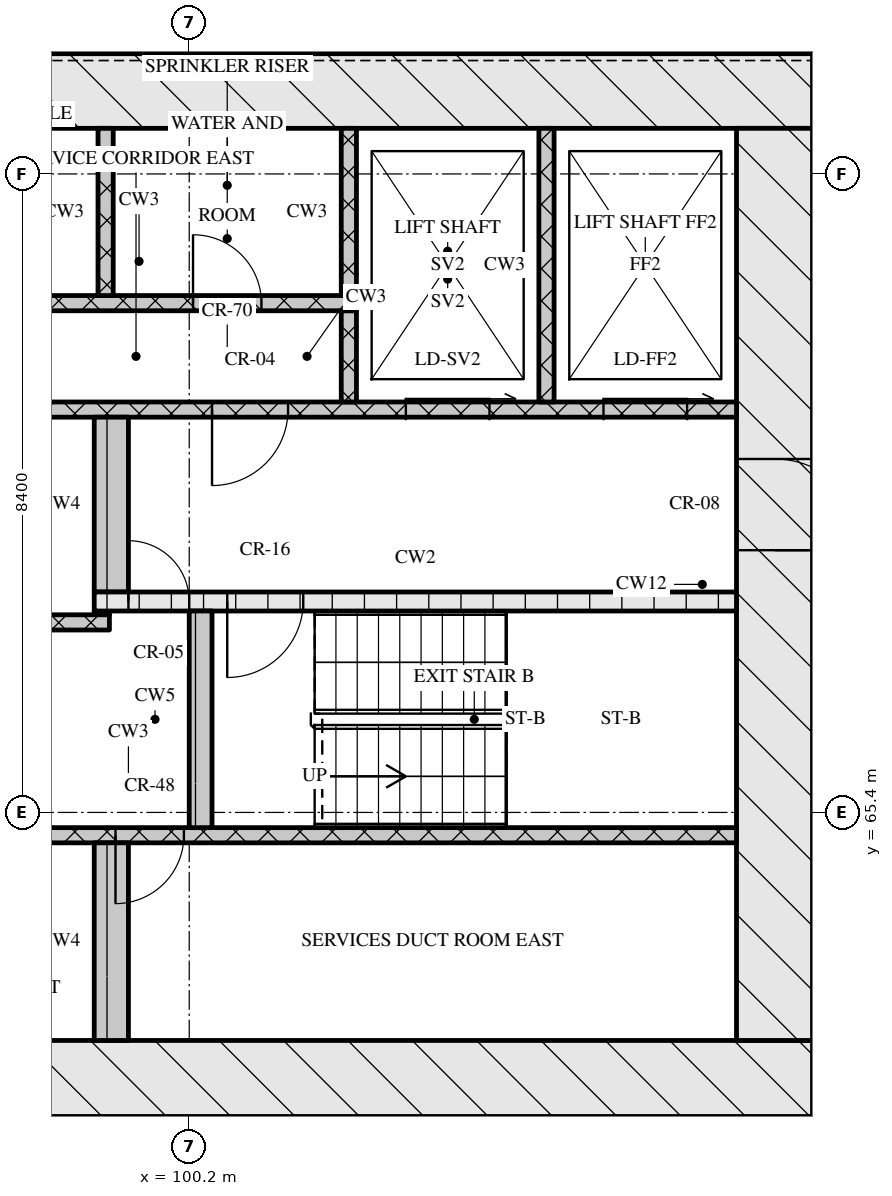
"""IFC4 building model, lengths in metres.
Left out: names, types, materials, properties, quantities, classifications, styles, units other than length and angle.
Written with IfcOpenShell. Run it as: python <this file> out.ifc"""

import sys

from ifc_helpers import new_model, si_unit, direction, frame, frame_2d, origin, place, context, subcontext, project, spatial, rectangle, extrude, element, fill, save


model = new_model("IFC4")
c1 = context("Model", 3, precision=1e-05, world=origin(), true_north=direction((0.0, 1.0)))
c2 = subcontext(c1, "Body", "Model", "MODEL_VIEW")
j1 = project(units=[si_unit("LENGTHUNIT", "METRE"), si_unit("PLANEANGLEUNIT", "RADIAN")], contexts=[c1])
p1 = place(None, origin())
s1 = spatial("IfcSite", under=j1, at=p1, CompositionType="ELEMENT")
p2 = place(p1, origin())
s2 = spatial("IfcBuilding", under=s1, at=p2, CompositionType="ELEMENT")
p3 = place(p2, frame((0.0, 0.0, 138.45)))
s3 = spatial("IfcBuildingStorey", under=s2, at=p3, CompositionType="ELEMENT", Elevation=138.45)
p4 = place(p3, frame((66.8, 61.9, 0.0), z_axis=(0.0, 0.0, 1.0), x_axis=(1.0, 0.0, 0.0)))
e1 = element("IfcWall", 1, at=p4, inside=s3, PredefinedType="SOLIDWALL", context=c2, shape_type="SweptSolid", body=[
    extrude(rectangle(XDim=41.6, YDim=1.0, at=frame_2d((20.8, 0.0))), origin(), (0.0, 0.0, 1.0), 3.3),
])
p5 = place(p4, frame((21.15, 0.0, 0.0)))
e2 = element("IfcOpeningElement", 2, at=p5, cuts=e1, PredefinedType="OPENING", context=c2, shape_type="SweptSolid", body=[
    extrude(rectangle(XDim=1.8, YDim=2.1, at=frame_2d((0.9, 1.05))), frame((0.0, 0.51, 0.0), z_axis=(0.0, -1.0, 0.0), x_axis=(1.0, 0.0, 0.0)), (0.0, 0.0, 1.0), 1.02),
])
p6 = place(p3, frame((66.8, 74.9, 0.0), z_axis=(0.0, 0.0, 1.0), x_axis=(1.0, 0.0, 0.0)))
e3 = element("IfcWall", 3, at=p6, inside=s3, PredefinedType="SOLIDWALL", context=c2, shape_type="SweptSolid", body=[
    extrude(rectangle(XDim=41.6, YDim=1.0, at=frame_2d((20.8, 0.0))), origin(), (0.0, 0.0, 1.0), 3.3),
])
p7 = place(p3, frame((107.9, 62.4, 0.0), z_axis=(0.0, 0.0, 1.0), x_axis=(0.0, 1.0, 0.0)))
e4 = element("IfcWall", 4, at=p7, inside=s3, PredefinedType="SOLIDWALL", context=c2, shape_type="SweptSolid", body=[
    extrude(rectangle(XDim=12.0, YDim=1.0, at=frame_2d((6.0, 0.0))), origin(), (0.0, 0.0, 1.0), 3.3),
])
p8 = place(p7, frame((6.45, 0.0, 0.0)))
e5 = element("IfcOpeningElement", 5, at=p8, cuts=e4, PredefinedType="OPENING", context=c2, shape_type="SweptSolid", body=[
    extrude(rectangle(XDim=1.2, YDim=2.1, at=frame_2d((0.6, 1.05))), frame((0.0, 0.51, 0.0), z_axis=(0.0, -1.0, 0.0), x_axis=(1.0, 0.0, 0.0)), (0.0, 0.0, 1.0), 1.02),
])
p9 = place(p3, frame((99.175, 62.4, 0.0), z_axis=(0.0, 0.0, 1.0), x_axis=(0.0, 1.0, 0.0)))
e6 = element("IfcWall", 6, at=p9, inside=s3, PredefinedType="SOLIDWALL", context=c2, shape_type="SweptSolid", body=[
    extrude(rectangle(XDim=2.6, YDim=0.45, at=frame_2d((1.3, 0.0))), origin(), (0.0, 0.0, 1.0), 3.3),
])
p10 = place(p3, frame((91.4, 65.1, 0.0), z_axis=(0.0, 0.0, 1.0), x_axis=(1.0, 0.0, 0.0)))
e7 = element("IfcWall", 7, at=p10, inside=s3, PredefinedType="SOLIDWALL", context=c2, shape_type="SweptSolid", body=[
    extrude(rectangle(XDim=16.0, YDim=0.2, at=frame_2d((8.0, 0.0))), origin(), (0.0, 0.0, 1.0), 3.3),
])
p11 = place(p10, frame((7.83, 0.0, 0.0)))
e8 = element("IfcOpeningElement", 8, at=p11, cuts=e7, PredefinedType="OPENING", context=c2, shape_type="SweptSolid", body=[
    extrude(rectangle(XDim=0.9, YDim=2.1, at=frame_2d((0.45, 1.05))), frame((0.0, 0.11, 0.0), z_axis=(0.0, -1.0, 0.0), x_axis=(1.0, 0.0, 0.0)), (0.0, 0.0, 1.0), 0.22),
])
p12 = place(p3, frame((100.35, 65.2, 0.0), z_axis=(0.0, 0.0, 1.0), x_axis=(0.0, 1.0, 0.0)))
e9 = element("IfcWall", 9, at=p12, inside=s3, PredefinedType="SOLIDWALL", context=c2, shape_type="SweptSolid", body=[
    extrude(rectangle(XDim=2.85, YDim=0.3, at=frame_2d((1.425, 0.0))), origin(), (0.0, 0.0, 1.0), 3.3),
])
p13 = place(p3, frame((76.05, 67.9, 0.0), z_axis=(0.0, 0.0, 1.0), x_axis=(1.0, 0.0, 0.0)))
e10 = element("IfcWall", 10, at=p13, inside=s3, PredefinedType="SOLIDWALL", context=c2, shape_type="SweptSolid", body=[
    extrude(rectangle(XDim=23.1, YDim=0.2, at=frame_2d((11.55, 0.0))), origin(), (0.0, 0.0, 1.0), 3.3),
])
p14 = place(p13, frame((0.6, 0.0, 0.0)))
e11 = element("IfcOpeningElement", 11, at=p14, cuts=e10, PredefinedType="OPENING", context=c2, shape_type="SweptSolid", body=[
    extrude(rectangle(XDim=1.1, YDim=2.1, at=frame_2d((0.55, 1.05))), frame((0.0, 0.11, 0.0), z_axis=(0.0, -1.0, 0.0), x_axis=(1.0, 0.0, 0.0)), (0.0, 0.0, 1.0), 0.22),
])
p15 = place(p13, frame((3.1, 0.0, 0.0)))
e12 = element("IfcOpeningElement", 12, at=p15, cuts=e10, PredefinedType="OPENING", context=c2, shape_type="SweptSolid", body=[
    extrude(rectangle(XDim=1.1, YDim=2.1, at=frame_2d((0.55, 1.05))), frame((0.0, 0.11, 0.0), z_axis=(0.0, -1.0, 0.0), x_axis=(1.0, 0.0, 0.0)), (0.0, 0.0, 1.0), 0.22),
])
p16 = place(p13, frame((5.6, 0.0, 0.0)))
e13 = element("IfcOpeningElement", 13, at=p16, cuts=e10, PredefinedType="OPENING", context=c2, shape_type="SweptSolid", body=[
    extrude(rectangle(XDim=1.1, YDim=2.1, at=frame_2d((0.55, 1.05))), frame((0.0, 0.11, 0.0), z_axis=(0.0, -1.0, 0.0), x_axis=(1.0, 0.0, 0.0)), (0.0, 0.0, 1.0), 0.22),
])
p17 = place(p13, frame((9.7, 0.0, 0.0)))
e14 = element("IfcOpeningElement", 14, at=p17, cuts=e10, PredefinedType="OPENING", context=c2, shape_type="SweptSolid", body=[
    extrude(rectangle(XDim=0.9, YDim=2.1, at=frame_2d((0.45, 1.05))), frame((0.0, 0.11, 0.0), z_axis=(0.0, -1.0, 0.0), x_axis=(1.0, 0.0, 0.0)), (0.0, 0.0, 1.0), 0.22),
])
p18 = place(p13, frame((13.55, 0.0, 0.0)))
e15 = element("IfcOpeningElement", 15, at=p18, cuts=e10, PredefinedType="OPENING", context=c2, shape_type="SweptSolid", body=[
    extrude(rectangle(XDim=1.0, YDim=2.1, at=frame_2d((0.5, 1.05))), frame((0.0, 0.11, 0.0), z_axis=(0.0, -1.0, 0.0), x_axis=(1.0, 0.0, 0.0)), (0.0, 0.0, 1.0), 0.22),
])
p19 = place(p3, frame((98.95, 68.025, 0.0), z_axis=(0.0, 0.0, 1.0), x_axis=(1.0, 0.0, 0.0)))
e16 = element("IfcWall", 16, at=p19, inside=s3, PredefinedType="SOLIDWALL", context=c2, shape_type="SweptSolid", body=[
    extrude(rectangle(XDim=0.2, YDim=0.05, at=frame_2d((0.1, 0.0))), origin(), (0.0, 0.0, 1.0), 3.3),
])
p20 = place(p3, frame((98.95, 68.175, 0.0), z_axis=(0.0, 0.0, 1.0), x_axis=(1.0, 0.0, 0.0)))
e17 = element("IfcWall", 17, at=p20, inside=s3, PredefinedType="SOLIDWALL", context=c2, shape_type="SweptSolid", body=[
    extrude(rectangle(XDim=8.45, YDim=0.25, at=frame_2d((4.225, 0.0))), origin(), (0.0, 0.0, 1.0), 3.3),
])
p21 = place(p20, frame((0.45, 0.0, 0.0)))
e18 = element("IfcOpeningElement", 18, at=p21, cuts=e17, PredefinedType="OPENING", context=c2, shape_type="SweptSolid", body=[
    extrude(rectangle(XDim=0.8, YDim=2.1, at=frame_2d((0.4, 1.05))), frame((0.0, 0.135, 0.0), z_axis=(0.0, -1.0, 0.0), x_axis=(1.0, 0.0, 0.0)), (0.0, 0.0, 1.0), 0.27),
])
p22 = place(p20, frame((1.75, 0.0, 0.0)))
e19 = element("IfcOpeningElement", 19, at=p22, cuts=e17, PredefinedType="OPENING", context=c2, shape_type="SweptSolid", body=[
    extrude(rectangle(XDim=1.0, YDim=2.1, at=frame_2d((0.5, 1.05))), frame((0.0, 0.135, 0.0), z_axis=(0.0, -1.0, 0.0), x_axis=(1.0, 0.0, 0.0)), (0.0, 0.0, 1.0), 0.27),
])
p23 = place(p3, frame((99.175, 68.3, 0.0), z_axis=(0.0, 0.0, 1.0), x_axis=(0.0, 1.0, 0.0)))
e20 = element("IfcWall", 20, at=p23, inside=s3, PredefinedType="SOLIDWALL", context=c2, shape_type="SweptSolid", body=[
    extrude(rectangle(XDim=2.3, YDim=0.45, at=frame_2d((1.15, 0.0))), origin(), (0.0, 0.0, 1.0), 3.3),
])
p24 = place(p3, frame((67.8, 70.7, 0.0), z_axis=(0.0, 0.0, 1.0), x_axis=(1.0, 0.0, 0.0)))
e21 = element("IfcWall", 21, at=p24, inside=s3, PredefinedType="SOLIDWALL", context=c2, shape_type="SweptSolid", body=[
    extrude(rectangle(XDim=39.6, YDim=0.2, at=frame_2d((19.8, 0.0))), origin(), (0.0, 0.0, 1.0), 3.3),
])
p25 = place(p24, frame((0.65, 0.0, 0.0)))
e22 = element("IfcOpeningElement", 22, at=p25, cuts=e21, PredefinedType="OPENING", context=c2, shape_type="SweptSolid", body=[
    extrude(rectangle(XDim=1.1, YDim=2.1, at=frame_2d((0.55, 1.05))), frame((0.0, 0.11, 0.0), z_axis=(0.0, -1.0, 0.0), x_axis=(1.0, 0.0, 0.0)), (0.0, 0.0, 1.0), 0.22),
])
p26 = place(p24, frame((3.25, 0.0, 0.0)))
e23 = element("IfcOpeningElement", 23, at=p26, cuts=e21, PredefinedType="OPENING", context=c2, shape_type="SweptSolid", body=[
    extrude(rectangle(XDim=1.1, YDim=2.1, at=frame_2d((0.55, 1.05))), frame((0.0, 0.11, 0.0), z_axis=(0.0, -1.0, 0.0), x_axis=(1.0, 0.0, 0.0)), (0.0, 0.0, 1.0), 0.22),
])
p27 = place(p24, frame((5.9, 0.0, 0.0)))
e24 = element("IfcOpeningElement", 24, at=p27, cuts=e21, PredefinedType="OPENING", context=c2, shape_type="SweptSolid", body=[
    extrude(rectangle(XDim=1.0, YDim=2.1, at=frame_2d((0.5, 1.05))), frame((0.0, 0.11, 0.0), z_axis=(0.0, -1.0, 0.0), x_axis=(1.0, 0.0, 0.0)), (0.0, 0.0, 1.0), 0.22),
])
p28 = place(p24, frame((21.7, 0.0, 0.0)))
e25 = element("IfcOpeningElement", 25, at=p28, cuts=e21, PredefinedType="OPENING", context=c2, shape_type="SweptSolid", body=[
    extrude(rectangle(XDim=1.0, YDim=2.1, at=frame_2d((0.5, 1.05))), frame((0.0, 0.11, 0.0), z_axis=(0.0, -1.0, 0.0), x_axis=(1.0, 0.0, 0.0)), (0.0, 0.0, 1.0), 0.22),
])
p29 = place(p24, frame((32.7, 0.0, 0.0)))
e26 = element("IfcOpeningElement", 26, at=p29, cuts=e21, PredefinedType="OPENING", context=c2, shape_type="SweptSolid", body=[
    extrude(rectangle(XDim=1.0, YDim=2.1, at=frame_2d((0.5, 1.05))), frame((0.0, 0.11, 0.0), z_axis=(0.0, -1.0, 0.0), x_axis=(1.0, 0.0, 0.0)), (0.0, 0.0, 1.0), 0.22),
])
p30 = place(p24, frame((35.25, 0.0, 0.0)))
e27 = element("IfcOpeningElement", 27, at=p30, cuts=e21, PredefinedType="OPENING", context=c2, shape_type="SweptSolid", body=[
    extrude(rectangle(XDim=1.1, YDim=2.1, at=frame_2d((0.55, 1.05))), frame((0.0, 0.11, 0.0), z_axis=(0.0, -1.0, 0.0), x_axis=(1.0, 0.0, 0.0)), (0.0, 0.0, 1.0), 0.22),
])
p31 = place(p24, frame((37.85, 0.0, 0.0)))
e28 = element("IfcOpeningElement", 28, at=p31, cuts=e21, PredefinedType="OPENING", context=c2, shape_type="SweptSolid", body=[
    extrude(rectangle(XDim=1.1, YDim=2.1, at=frame_2d((0.55, 1.05))), frame((0.0, 0.11, 0.0), z_axis=(0.0, -1.0, 0.0), x_axis=(1.0, 0.0, 0.0)), (0.0, 0.0, 1.0), 0.22),
])
p32 = place(p3, frame((102.3, 70.8, 0.0), z_axis=(0.0, 0.0, 1.0), x_axis=(0.0, 1.0, 0.0)))
e29 = element("IfcWall", 29, at=p32, inside=s3, PredefinedType="SOLIDWALL", context=c2, shape_type="SweptSolid", body=[
    extrude(rectangle(XDim=1.2, YDim=0.2, at=frame_2d((0.6, 0.0))), origin(), (0.0, 0.0, 1.0), 3.3),
])
p33 = place(p3, frame((104.9, 70.8, 0.0), z_axis=(0.0, 0.0, 1.0), x_axis=(0.0, 1.0, 0.0)))
e30 = element("IfcWall", 30, at=p33, inside=s3, PredefinedType="SOLIDWALL", context=c2, shape_type="SweptSolid", body=[
    extrude(rectangle(XDim=3.6, YDim=0.2, at=frame_2d((1.8, 0.0))), origin(), (0.0, 0.0, 1.0), 3.3),
])
p34 = place(p3, frame((96.68, 72.1, 0.0), z_axis=(0.0, 0.0, 1.0), x_axis=(1.0, 0.0, 0.0)))
e31 = element("IfcWall", 31, at=p34, inside=s3, PredefinedType="SOLIDWALL", context=c2, shape_type="SweptSolid", body=[
    extrude(rectangle(XDim=5.72, YDim=0.2, at=frame_2d((2.86, 0.0))), origin(), (0.0, 0.0, 1.0), 3.3),
])
p35 = place(p34, frame((0.77, 0.0, 0.0)))
e32 = element("IfcOpeningElement", 32, at=p35, cuts=e31, PredefinedType="OPENING", context=c2, shape_type="SweptSolid", body=[
    extrude(rectangle(XDim=0.9, YDim=2.1, at=frame_2d((0.45, 1.05))), frame((0.0, 0.11, 0.0), z_axis=(0.0, -1.0, 0.0), x_axis=(1.0, 0.0, 0.0)), (0.0, 0.0, 1.0), 0.22),
])
p36 = place(p34, frame((3.57, 0.0, 0.0)))
e33 = element("IfcOpeningElement", 33, at=p36, cuts=e31, PredefinedType="OPENING", context=c2, shape_type="SweptSolid", body=[
    extrude(rectangle(XDim=0.9, YDim=2.1, at=frame_2d((0.45, 1.05))), frame((0.0, 0.11, 0.0), z_axis=(0.0, -1.0, 0.0), x_axis=(1.0, 0.0, 0.0)), (0.0, 0.0, 1.0), 0.22),
])
for number, where, z_axis, x_axis in (
    (34, (99.1, 72.2, 0.0), (0.0, 0.0, 1.0), (0.0, 1.0, 0.0)),
    (35, (102.3, 72.2, 0.0), (0.0, 0.0, 1.0), (0.0, 1.0, 0.0)),
):
    element("IfcWall", number, at=place(p3, frame(where, z_axis=z_axis, x_axis=x_axis)), inside=s3, PredefinedType="SOLIDWALL", context=c2, shape_type="SweptSolid", body=[
        extrude(rectangle(XDim=2.2, YDim=0.2, at=frame_2d((1.1, 0.0))), origin(), (0.0, 0.0, 1.0), 3.3),
    ])
p37 = place(p11, origin())
e36 = element("IfcDoor", 36, at=p37, inside=s3, OperationType="SINGLE_SWING_RIGHT", PredefinedType="DOOR", context=c2, shape_type="SweptSolid", body=[
    extrude(rectangle(XDim=0.9, YDim=2.1, at=frame_2d((0.45, 1.05))), frame((0.0, 0.025, 0.0), z_axis=(0.0, -1.0, 0.0), x_axis=(1.0, 0.0, 0.0)), (0.0, 0.0, 1.0), 0.05),
])
fill(e8, e36)
p38 = place(p21, origin())
e37 = element("IfcDoor", 37, at=p38, inside=s3, OperationType="SINGLE_SWING_LEFT", PredefinedType="DOOR", context=c2, shape_type="SweptSolid", body=[
    extrude(rectangle(XDim=0.8, YDim=2.1, at=frame_2d((0.4, 1.05))), frame((0.0, 0.025, 0.0), z_axis=(0.0, -1.0, 0.0), x_axis=(1.0, 0.0, 0.0)), (0.0, 0.0, 1.0), 0.05),
])
fill(e18, e37)
p39 = place(p22, origin())
e38 = element("IfcDoor", 38, at=p39, inside=s3, OperationType="SINGLE_SWING_RIGHT", PredefinedType="DOOR", context=c2, shape_type="SweptSolid", body=[
    extrude(rectangle(XDim=1.0, YDim=2.1, at=frame_2d((0.5, 1.05))), frame((0.0, 0.025, 0.0), z_axis=(0.0, -1.0, 0.0), x_axis=(1.0, 0.0, 0.0)), (0.0, 0.0, 1.0), 0.05),
])
fill(e19, e38)
p40 = place(p8, origin())
e39 = element("IfcDoor", 39, at=p40, inside=s3, OperationType="SINGLE_SWING_RIGHT", PredefinedType="DOOR", context=c2, shape_type="SweptSolid", body=[
    extrude(rectangle(XDim=1.2, YDim=2.1, at=frame_2d((0.6, 1.05))), frame((0.0, 0.025, 0.0), z_axis=(0.0, -1.0, 0.0), x_axis=(1.0, 0.0, 0.0)), (0.0, 0.0, 1.0), 0.05),
])
fill(e5, e39)
p41 = place(p29, origin())
e40 = element("IfcDoor", 40, at=p41, inside=s3, OperationType="SINGLE_SWING_RIGHT", PredefinedType="DOOR", context=c2, shape_type="SweptSolid", body=[
    extrude(rectangle(XDim=1.0, YDim=2.1, at=frame_2d((0.5, 1.05))), frame((0.0, 0.025, 0.0), z_axis=(0.0, -1.0, 0.0), x_axis=(1.0, 0.0, 0.0)), (0.0, 0.0, 1.0), 0.05),
])
fill(e26, e40)
p42 = place(p30, origin())
e41 = element("IfcDoor", 41, at=p42, inside=s3, OperationType="SLIDING_TO_RIGHT", PredefinedType="DOOR", context=c2, shape_type="SweptSolid", body=[
    extrude(rectangle(XDim=1.1, YDim=2.1, at=frame_2d((0.55, 1.05))), frame((0.0, 0.025, 0.0), z_axis=(0.0, -1.0, 0.0), x_axis=(1.0, 0.0, 0.0)), (0.0, 0.0, 1.0), 0.05),
])
fill(e27, e41)
p43 = place(p31, origin())
e42 = element("IfcDoor", 42, at=p43, inside=s3, OperationType="SLIDING_TO_RIGHT", PredefinedType="DOOR", context=c2, shape_type="SweptSolid", body=[
    extrude(rectangle(XDim=1.1, YDim=2.1, at=frame_2d((0.55, 1.05))), frame((0.0, 0.025, 0.0), z_axis=(0.0, -1.0, 0.0), x_axis=(1.0, 0.0, 0.0)), (0.0, 0.0, 1.0), 0.05),
])
fill(e28, e42)
p44 = place(p36, origin())
e43 = element("IfcDoor", 43, at=p44, inside=s3, OperationType="SINGLE_SWING_LEFT", PredefinedType="DOOR", context=c2, shape_type="SweptSolid", body=[
    extrude(rectangle(XDim=0.9, YDim=2.1, at=frame_2d((0.45, 1.05))), frame((0.0, 0.025, 0.0), z_axis=(0.0, -1.0, 0.0), x_axis=(1.0, 0.0, 0.0)), (0.0, 0.0, 1.0), 0.05),
])
fill(e33, e43)
save(model, sys.argv[1])
